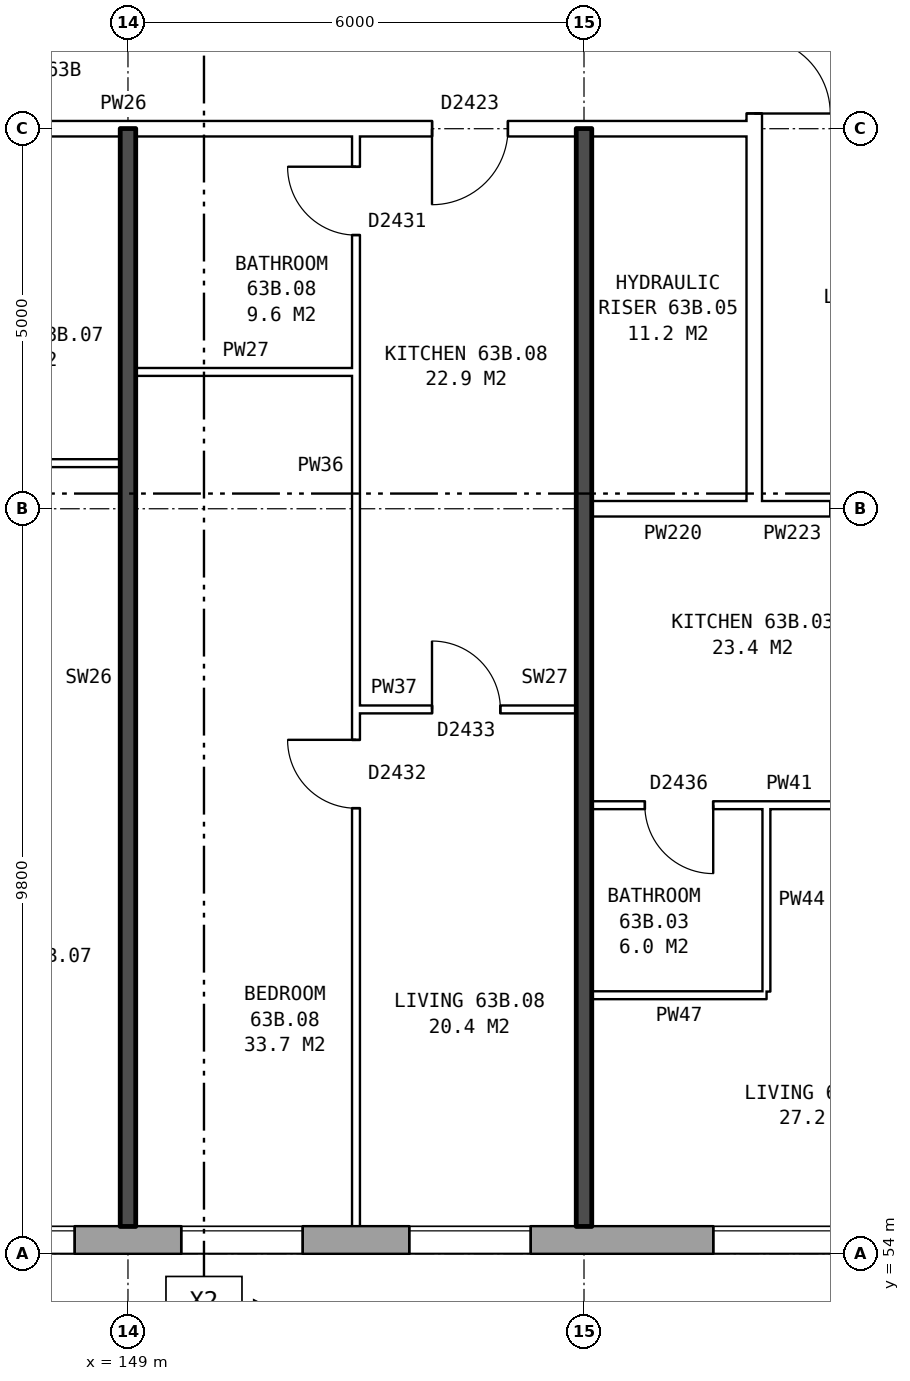
"""IFC4 building model, lengths in metres.
Left out: names, types, materials, properties, quantities, classifications, styles, units other than length and angle.
Written with IfcOpenShell. Run it as: python <this file> out.ifc"""

import sys

from ifc_helpers import new_model, si_unit, direction, frame, frame_2d, origin, place, context, subcontext, project, spatial, rectangle, extrude, element, fill, save


model = new_model("IFC4")
c1 = context("Model", 3, precision=1e-05, world=origin(), true_north=direction((0.0, 1.0)))
c2 = subcontext(c1, "Body", "Model", "MODEL_VIEW")
j1 = project(units=[si_unit("LENGTHUNIT", "METRE"), si_unit("PLANEANGLEUNIT", "RADIAN")], contexts=[c1])
p1 = place(None, origin())
s1 = spatial("IfcSite", under=j1, at=p1, CompositionType="ELEMENT")
p2 = place(p1, origin())
s2 = spatial("IfcBuilding", under=s1, at=p2, CompositionType="ELEMENT")
p3 = place(p2, frame((0.0, 0.0, 224.5)))
s3 = spatial("IfcBuildingStorey", under=s2, at=p3, CompositionType="ELEMENT", Elevation=224.5)
p4 = place(p3, frame((132.05, 54.18, 0.0), z_axis=(0.0, 0.0, 1.0), x_axis=(1.0, 0.0, 0.0)))
e1 = element("IfcWall", 1, at=p4, inside=s3, PredefinedType="STANDARD", context=c2, shape_type="SweptSolid", body=[
    extrude(rectangle(XDim=33.875, YDim=0.36, at=frame_2d((16.938, 0.0))), origin(), (0.0, 0.0, 1.0), 2.85),
])
p5 = place(p4, frame((2.65, 0.0, 0.8)))
e2 = element("IfcOpeningElement", 2, at=p5, cuts=e1, PredefinedType="OPENING", context=c2, shape_type="SweptSolid", body=[
    extrude(rectangle(XDim=1.6, YDim=1.8, at=frame_2d((0.8, 0.9))), frame((0.0, 0.19, 0.0), z_axis=(0.0, -1.0, 0.0), x_axis=(1.0, 0.0, 0.0)), (0.0, 0.0, 1.0), 0.38),
])
p6 = place(p4, frame((5.65, 0.0, 0.8)))
e3 = element("IfcOpeningElement", 3, at=p6, cuts=e1, PredefinedType="OPENING", context=c2, shape_type="SweptSolid", body=[
    extrude(rectangle(XDim=1.6, YDim=1.8, at=frame_2d((0.8, 0.9))), frame((0.0, 0.19, 0.0), z_axis=(0.0, -1.0, 0.0), x_axis=(1.0, 0.0, 0.0)), (0.0, 0.0, 1.0), 0.38),
])
p7 = place(p4, frame((8.65, 0.0, 0.8)))
e4 = element("IfcOpeningElement", 4, at=p7, cuts=e1, PredefinedType="OPENING", context=c2, shape_type="SweptSolid", body=[
    extrude(rectangle(XDim=1.6, YDim=1.8, at=frame_2d((0.8, 0.9))), frame((0.0, 0.19, 0.0), z_axis=(0.0, -1.0, 0.0), x_axis=(1.0, 0.0, 0.0)), (0.0, 0.0, 1.0), 0.38),
])
p8 = place(p4, frame((11.15, 0.0, 1.7)))
e5 = element("IfcOpeningElement", 5, at=p8, cuts=e1, PredefinedType="OPENING", context=c2, shape_type="SweptSolid", body=[
    extrude(rectangle(XDim=0.6, YDim=0.9, at=frame_2d((0.3, 0.45))), frame((0.0, 0.19, 0.0), z_axis=(0.0, -1.0, 0.0), x_axis=(1.0, 0.0, 0.0)), (0.0, 0.0, 1.0), 0.38),
])
p9 = place(p4, frame((14.65, 0.0, 0.8)))
e6 = element("IfcOpeningElement", 6, at=p9, cuts=e1, PredefinedType="OPENING", context=c2, shape_type="SweptSolid", body=[
    extrude(rectangle(XDim=1.6, YDim=1.8, at=frame_2d((0.8, 0.9))), frame((0.0, 0.19, 0.0), z_axis=(0.0, -1.0, 0.0), x_axis=(1.0, 0.0, 0.0)), (0.0, 0.0, 1.0), 0.38),
])
p10 = place(p4, frame((17.65, 0.0, 0.8)))
e7 = element("IfcOpeningElement", 7, at=p10, cuts=e1, PredefinedType="OPENING", context=c2, shape_type="SweptSolid", body=[
    extrude(rectangle(XDim=1.6, YDim=1.8, at=frame_2d((0.8, 0.9))), frame((0.0, 0.19, 0.0), z_axis=(0.0, -1.0, 0.0), x_axis=(1.0, 0.0, 0.0)), (0.0, 0.0, 1.0), 0.38),
])
p11 = place(p4, frame((20.65, 0.0, 0.8)))
e8 = element("IfcOpeningElement", 8, at=p11, cuts=e1, PredefinedType="OPENING", context=c2, shape_type="SweptSolid", body=[
    extrude(rectangle(XDim=1.6, YDim=1.8, at=frame_2d((0.8, 0.9))), frame((0.0, 0.19, 0.0), z_axis=(0.0, -1.0, 0.0), x_axis=(1.0, 0.0, 0.0)), (0.0, 0.0, 1.0), 0.38),
])
p12 = place(p4, frame((24.65, 0.0, 0.8)))
e9 = element("IfcOpeningElement", 9, at=p12, cuts=e1, PredefinedType="OPENING", context=c2, shape_type="SweptSolid", body=[
    extrude(rectangle(XDim=1.6, YDim=1.8, at=frame_2d((0.8, 0.9))), frame((0.0, 0.19, 0.0), z_axis=(0.0, -1.0, 0.0), x_axis=(1.0, 0.0, 0.0)), (0.0, 0.0, 1.0), 0.38),
])
p13 = place(p4, frame((26.65, 0.0, 0.8)))
e10 = element("IfcOpeningElement", 10, at=p13, cuts=e1, PredefinedType="OPENING", context=c2, shape_type="SweptSolid", body=[
    extrude(rectangle(XDim=1.6, YDim=1.8, at=frame_2d((0.8, 0.9))), frame((0.0, 0.19, 0.0), z_axis=(0.0, -1.0, 0.0), x_axis=(1.0, 0.0, 0.0)), (0.0, 0.0, 1.0), 0.38),
])
p14 = place(p4, frame((29.65, 0.0, 0.8)))
e11 = element("IfcOpeningElement", 11, at=p14, cuts=e1, PredefinedType="OPENING", context=c2, shape_type="SweptSolid", body=[
    extrude(rectangle(XDim=1.6, YDim=1.8, at=frame_2d((0.8, 0.9))), frame((0.0, 0.19, 0.0), z_axis=(0.0, -1.0, 0.0), x_axis=(1.0, 0.0, 0.0)), (0.0, 0.0, 1.0), 0.38),
])
p15 = place(p4, frame((13.2, 0.0, 0.8)))
e12 = element("IfcOpeningElement", 12, at=p15, cuts=e1, PredefinedType="OPENING", context=c2, shape_type="SweptSolid", body=[
    extrude(rectangle(XDim=0.6, YDim=1.5, at=frame_2d((0.3, 0.75))), frame((0.0, 0.19, 0.0), z_axis=(0.0, -1.0, 0.0), x_axis=(1.0, 0.0, 0.0)), (0.0, 0.0, 1.0), 0.38),
])
p16 = place(p3, frame((157.24, 63.9, 0.0), z_axis=(0.0, 0.0, 1.0), x_axis=(0.0, 1.0, 0.0)))
e13 = element("IfcWall", 13, at=p16, inside=s3, PredefinedType="PARTITIONING", context=c2, shape_type="SweptSolid", body=[
    extrude(rectangle(XDim=12.2, YDim=0.2, at=frame_2d((6.1, 0.0))), origin(), (0.0, 0.0, 1.0), 2.85),
])
p17 = place(p16, frame((5.1, 0.0, 0.0)))
e14 = element("IfcOpeningElement", 14, at=p17, cuts=e13, PredefinedType="OPENING", context=c2, shape_type="SweptSolid", body=[
    extrude(rectangle(XDim=2.0, YDim=2.1, at=frame_2d((1.0, 1.05))), frame((0.0, 0.11, 0.0), z_axis=(0.0, -1.0, 0.0), x_axis=(1.0, 0.0, 0.0)), (0.0, 0.0, 1.0), 0.22),
])
p18 = place(p3, frame((155.1, 57.4, 0.0), z_axis=(0.0, 0.0, 1.0), x_axis=(1.0, 0.0, 0.0)))
e15 = element("IfcWall", 15, at=p18, inside=s3, PredefinedType="PARTITIONING", context=c2, shape_type="SweptSolid", body=[
    extrude(rectangle(XDim=2.3, YDim=0.1, at=frame_2d((1.15, 0.0))), origin(), (0.0, 0.0, 1.0), 2.85),
])
p19 = place(p3, frame((155.1, 59.9, 0.0), z_axis=(0.0, 0.0, 1.0), x_axis=(1.0, 0.0, 0.0)))
e16 = element("IfcWall", 16, at=p19, inside=s3, PredefinedType="PARTITIONING", context=c2, shape_type="SweptSolid", body=[
    extrude(rectangle(XDim=5.8, YDim=0.1, at=frame_2d((2.9, 0.0))), origin(), (0.0, 0.0, 1.0), 2.85),
])
p20 = place(p19, frame((3.6, 0.0, 0.0)))
e17 = element("IfcOpeningElement", 17, at=p20, cuts=e16, PredefinedType="OPENING", context=c2, shape_type="SweptSolid", body=[
    extrude(rectangle(XDim=0.9, YDim=2.1, at=frame_2d((0.45, 1.05))), frame((0.0, 0.06, 0.0), z_axis=(0.0, -1.0, 0.0), x_axis=(1.0, 0.0, 0.0)), (0.0, 0.0, 1.0), 0.12),
])
p21 = place(p19, frame((0.7, 0.0, 0.0)))
e18 = element("IfcOpeningElement", 18, at=p21, cuts=e16, PredefinedType="OPENING", context=c2, shape_type="SweptSolid", body=[
    extrude(rectangle(XDim=0.9, YDim=2.1, at=frame_2d((0.45, 1.05))), frame((0.0, 0.06, 0.0), z_axis=(0.0, -1.0, 0.0), x_axis=(1.0, 0.0, 0.0)), (0.0, 0.0, 1.0), 0.12),
])
p22 = place(p3, frame((152.0, 61.16, 0.0), z_axis=(0.0, 0.0, 1.0), x_axis=(1.0, 0.0, 0.0)))
e19 = element("IfcWall", 19, at=p22, inside=s3, PredefinedType="PARTITIONING", context=c2, shape_type="SweptSolid", body=[
    extrude(rectangle(XDim=2.9, YDim=0.1, at=frame_2d((1.45, 0.0))), origin(), (0.0, 0.0, 1.0), 2.85),
])
p23 = place(p22, frame((1.0, 0.0, 0.0)))
e20 = element("IfcOpeningElement", 20, at=p23, cuts=e19, PredefinedType="OPENING", context=c2, shape_type="SweptSolid", body=[
    extrude(rectangle(XDim=0.9, YDim=2.1, at=frame_2d((0.45, 1.05))), frame((0.0, 0.06, 0.0), z_axis=(0.0, -1.0, 0.0), x_axis=(1.0, 0.0, 0.0)), (0.0, 0.0, 1.0), 0.12),
])
p24 = place(p3, frame((155.1, 63.8, 0.0), z_axis=(0.0, 0.0, 1.0), x_axis=(1.0, 0.0, 0.0)))
e21 = element("IfcWall", 21, at=p24, inside=s3, PredefinedType="PARTITIONING", context=c2, shape_type="SweptSolid", body=[
    extrude(rectangle(XDim=2.14, YDim=0.2, at=frame_2d((1.07, 0.0))), origin(), (0.0, 0.0, 1.0), 2.85),
])
p25 = place(p3, frame((157.24, 63.8, 0.0), z_axis=(0.0, 0.0, 1.0), x_axis=(1.0, 0.0, 0.0)))
e22 = element("IfcWall", 22, at=p25, inside=s3, PredefinedType="PARTITIONING", context=c2, shape_type="SweptSolid", body=[
    extrude(rectangle(XDim=3.0, YDim=0.2, at=frame_2d((1.5, 0.0))), origin(), (0.0, 0.0, 1.0), 2.85),
])
p26 = place(p25, frame((1.0, 0.0, 0.0)))
e23 = element("IfcOpeningElement", 23, at=p26, cuts=e22, PredefinedType="OPENING", context=c2, shape_type="SweptSolid", body=[
    extrude(rectangle(XDim=1.0, YDim=2.1, at=frame_2d((0.5, 1.05))), frame((0.0, 0.11, 0.0), z_axis=(0.0, -1.0, 0.0), x_axis=(1.0, 0.0, 0.0)), (0.0, 0.0, 1.0), 0.22),
])
for number, where, z_axis, x_axis in (
    (24, (146.0, 64.4, 0.0), (0.0, 0.0, 1.0), (1.0, 0.0, 0.0)),
    (25, (149.1, 65.6, 0.0), (0.0, 0.0, 1.0), (1.0, 0.0, 0.0)),
):
    element("IfcWall", number, at=place(p3, frame(where, z_axis=z_axis, x_axis=x_axis)), inside=s3, PredefinedType="PARTITIONING", context=c2, shape_type="SweptSolid", body=[
        extrude(rectangle(XDim=2.9, YDim=0.1, at=frame_2d((1.45, 0.0))), origin(), (0.0, 0.0, 1.0), 2.85),
    ])
p27 = place(p3, frame((142.76, 68.8, 0.0), z_axis=(0.0, 0.0, 1.0), x_axis=(1.0, 0.0, 0.0)))
e26 = element("IfcWall", 26, at=p27, inside=s3, PredefinedType="PARTITIONING", context=c2, shape_type="SweptSolid", body=[
    extrude(rectangle(XDim=14.48, YDim=0.2, at=frame_2d((7.24, 0.0))), origin(), (0.0, 0.0, 1.0), 2.85),
])
p28 = place(p27, frame((1.12, 0.0, 0.0)))
e27 = element("IfcOpeningElement", 27, at=p28, cuts=e26, PredefinedType="OPENING", context=c2, shape_type="SweptSolid", body=[
    extrude(rectangle(XDim=1.0, YDim=2.1, at=frame_2d((0.5, 1.05))), frame((0.0, 0.11, 0.0), z_axis=(0.0, -1.0, 0.0), x_axis=(1.0, 0.0, 0.0)), (0.0, 0.0, 1.0), 0.22),
])
p29 = place(p27, frame((10.24, 0.0, 0.0)))
e28 = element("IfcOpeningElement", 28, at=p29, cuts=e26, PredefinedType="OPENING", context=c2, shape_type="SweptSolid", body=[
    extrude(rectangle(XDim=1.0, YDim=2.1, at=frame_2d((0.5, 1.05))), frame((0.0, 0.11, 0.0), z_axis=(0.0, -1.0, 0.0), x_axis=(1.0, 0.0, 0.0)), (0.0, 0.0, 1.0), 0.22),
])
p30 = place(p3, frame((149.0, 54.36, 0.0), z_axis=(0.0, 0.0, 1.0), x_axis=(0.0, 1.0, 0.0)))
e29 = element("IfcWall", 29, at=p30, inside=s3, PredefinedType="SOLIDWALL", context=c2, shape_type="SweptSolid", body=[
    extrude(rectangle(XDim=14.44, YDim=0.2, at=frame_2d((7.22, 0.0))), origin(), (0.0, 0.0, 1.0), 2.85),
])
p31 = place(p3, frame((152.0, 54.36, 0.0), z_axis=(0.0, 0.0, 1.0), x_axis=(0.0, 1.0, 0.0)))
e30 = element("IfcWall", 30, at=p31, inside=s3, PredefinedType="PARTITIONING", context=c2, shape_type="SweptSolid", body=[
    extrude(rectangle(XDim=14.34, YDim=0.1, at=frame_2d((7.17, 0.0))), origin(), (0.0, 0.0, 1.0), 2.85),
])
p32 = place(p31, frame((5.5, 0.0, 0.0)))
e31 = element("IfcOpeningElement", 31, at=p32, cuts=e30, PredefinedType="OPENING", context=c2, shape_type="SweptSolid", body=[
    extrude(rectangle(XDim=0.9, YDim=2.1, at=frame_2d((0.45, 1.05))), frame((0.0, 0.06, 0.0), z_axis=(0.0, -1.0, 0.0), x_axis=(1.0, 0.0, 0.0)), (0.0, 0.0, 1.0), 0.12),
])
p33 = place(p31, frame((13.04, 0.0, 0.0)))
e32 = element("IfcOpeningElement", 32, at=p33, cuts=e30, PredefinedType="OPENING", context=c2, shape_type="SweptSolid", body=[
    extrude(rectangle(XDim=0.9, YDim=2.1, at=frame_2d((0.45, 1.05))), frame((0.0, 0.06, 0.0), z_axis=(0.0, -1.0, 0.0), x_axis=(1.0, 0.0, 0.0)), (0.0, 0.0, 1.0), 0.12),
])
p34 = place(p3, frame((155.0, 54.36, 0.0), z_axis=(0.0, 0.0, 1.0), x_axis=(0.0, 1.0, 0.0)))
e33 = element("IfcWall", 33, at=p34, inside=s3, PredefinedType="SOLIDWALL", context=c2, shape_type="SweptSolid", body=[
    extrude(rectangle(XDim=14.44, YDim=0.2, at=frame_2d((7.22, 0.0))), origin(), (0.0, 0.0, 1.0), 2.85),
])
p35 = place(p3, frame((157.4, 57.45, 0.0), z_axis=(0.0, 0.0, 1.0), x_axis=(0.0, 1.0, 0.0)))
e34 = element("IfcWall", 34, at=p35, inside=s3, PredefinedType="PARTITIONING", context=c2, shape_type="SweptSolid", body=[
    extrude(rectangle(XDim=2.4, YDim=0.1, at=frame_2d((1.2, 0.0))), origin(), (0.0, 0.0, 1.0), 2.85),
])
p36 = place(p9, origin())
e35 = element("IfcWindow", 35, at=p36, inside=s3, PartitioningType="SINGLE_PANEL", PredefinedType="WINDOW", context=c2, shape_type="SweptSolid", body=[
    extrude(rectangle(XDim=1.6, YDim=1.8, at=frame_2d((0.8, 0.9))), frame((0.0, 0.15, 0.0), z_axis=(0.0, -1.0, 0.0), x_axis=(1.0, 0.0, 0.0)), (0.0, 0.0, 1.0), 0.06),
])
fill(e6, e35)
p37 = place(p10, origin())
e36 = element("IfcWindow", 36, at=p37, inside=s3, PartitioningType="SINGLE_PANEL", PredefinedType="WINDOW", context=c2, shape_type="SweptSolid", body=[
    extrude(rectangle(XDim=1.6, YDim=1.8, at=frame_2d((0.8, 0.9))), frame((0.0, 0.15, 0.0), z_axis=(0.0, -1.0, 0.0), x_axis=(1.0, 0.0, 0.0)), (0.0, 0.0, 1.0), 0.06),
])
fill(e7, e36)
p38 = place(p11, origin())
e37 = element("IfcWindow", 37, at=p38, inside=s3, PartitioningType="SINGLE_PANEL", PredefinedType="WINDOW", context=c2, shape_type="SweptSolid", body=[
    extrude(rectangle(XDim=1.6, YDim=1.8, at=frame_2d((0.8, 0.9))), frame((0.0, 0.15, 0.0), z_axis=(0.0, -1.0, 0.0), x_axis=(1.0, 0.0, 0.0)), (0.0, 0.0, 1.0), 0.06),
])
fill(e8, e37)
p39 = place(p12, origin())
e38 = element("IfcWindow", 38, at=p39, inside=s3, PartitioningType="SINGLE_PANEL", PredefinedType="WINDOW", context=c2, shape_type="SweptSolid", body=[
    extrude(rectangle(XDim=1.6, YDim=1.8, at=frame_2d((0.8, 0.9))), frame((0.0, 0.15, 0.0), z_axis=(0.0, -1.0, 0.0), x_axis=(1.0, 0.0, 0.0)), (0.0, 0.0, 1.0), 0.06),
])
fill(e9, e38)
p40 = place(p17, frame((2.0, 0.0, 0.0), z_axis=(0.0, 0.0, 1.0), x_axis=(-1.0, 0.0, 0.0)))
e39 = element("IfcDoor", 39, at=p40, inside=s3, OperationType="DOUBLE_DOOR_SINGLE_SWING", PredefinedType="DOOR", context=c2, shape_type="SweptSolid", body=[
    extrude(rectangle(XDim=2.0, YDim=2.1, at=frame_2d((1.0, 1.05))), frame((0.0, 0.025, 0.0), z_axis=(0.0, -1.0, 0.0), x_axis=(1.0, 0.0, 0.0)), (0.0, 0.0, 1.0), 0.05),
])
fill(e14, e39)
p41 = place(p21, frame((0.9, 0.0, 0.0), z_axis=(0.0, 0.0, 1.0), x_axis=(-1.0, 0.0, 0.0)))
e40 = element("IfcDoor", 40, at=p41, inside=s3, OperationType="SINGLE_SWING_LEFT", PredefinedType="DOOR", context=c2, shape_type="SweptSolid", body=[
    extrude(rectangle(XDim=0.9, YDim=2.1, at=frame_2d((0.45, 1.05))), frame((0.0, 0.025, 0.0), z_axis=(0.0, -1.0, 0.0), x_axis=(1.0, 0.0, 0.0)), (0.0, 0.0, 1.0), 0.05),
])
fill(e18, e40)
p42 = place(p32, origin())
e41 = element("IfcDoor", 41, at=p42, inside=s3, OperationType="SINGLE_SWING_RIGHT", PredefinedType="DOOR", context=c2, shape_type="SweptSolid", body=[
    extrude(rectangle(XDim=0.9, YDim=2.1, at=frame_2d((0.45, 1.05))), frame((0.0, 0.025, 0.0), z_axis=(0.0, -1.0, 0.0), x_axis=(1.0, 0.0, 0.0)), (0.0, 0.0, 1.0), 0.05),
])
fill(e31, e41)
p43 = place(p29, frame((1.0, 0.0, 0.0), z_axis=(0.0, 0.0, 1.0), x_axis=(-1.0, 0.0, 0.0)))
e42 = element("IfcDoor", 42, at=p43, inside=s3, OperationType="SINGLE_SWING_RIGHT", PredefinedType="DOOR", context=c2, shape_type="SweptSolid", body=[
    extrude(rectangle(XDim=1.0, YDim=2.1, at=frame_2d((0.5, 1.05))), frame((0.0, 0.025, 0.0), z_axis=(0.0, -1.0, 0.0), x_axis=(1.0, 0.0, 0.0)), (0.0, 0.0, 1.0), 0.05),
])
fill(e28, e42)
p44 = place(p23, origin())
e43 = element("IfcDoor", 43, at=p44, inside=s3, OperationType="SINGLE_SWING_LEFT", PredefinedType="DOOR", context=c2, shape_type="SweptSolid", body=[
    extrude(rectangle(XDim=0.9, YDim=2.1, at=frame_2d((0.45, 1.05))), frame((0.0, 0.025, 0.0), z_axis=(0.0, -1.0, 0.0), x_axis=(1.0, 0.0, 0.0)), (0.0, 0.0, 1.0), 0.05),
])
fill(e20, e43)
p45 = place(p33, origin())
e44 = element("IfcDoor", 44, at=p45, inside=s3, OperationType="SINGLE_SWING_RIGHT", PredefinedType="DOOR", context=c2, shape_type="SweptSolid", body=[
    extrude(rectangle(XDim=0.9, YDim=2.1, at=frame_2d((0.45, 1.05))), frame((0.0, 0.025, 0.0), z_axis=(0.0, -1.0, 0.0), x_axis=(1.0, 0.0, 0.0)), (0.0, 0.0, 1.0), 0.05),
])
fill(e32, e44)
save(model, sys.argv[1])
